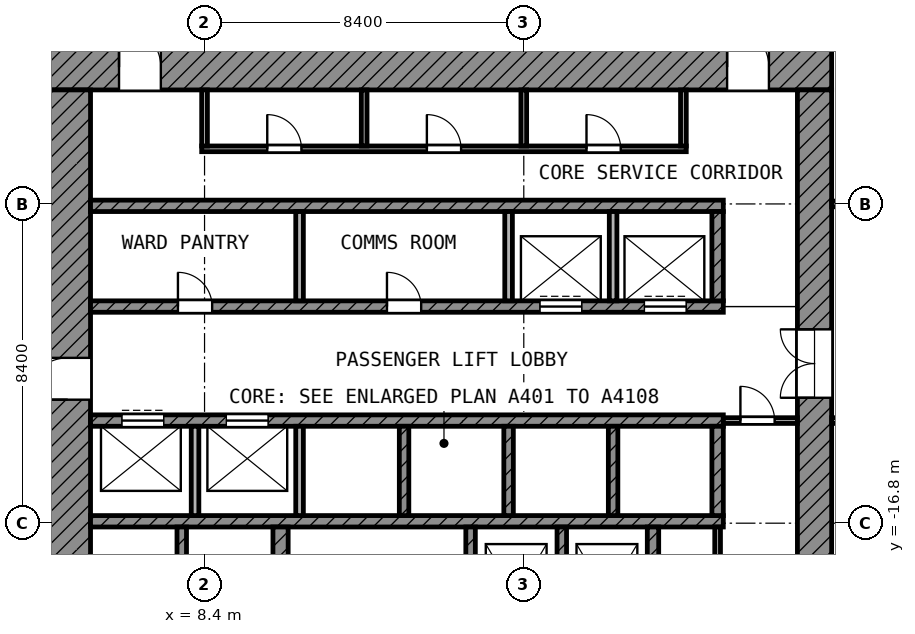
"""IFC4 building model, lengths in metres.
Left out: names, types, materials, properties, quantities, classifications, styles, units other than length and angle.
Written with IfcOpenShell. Run it as: python <this file> out.ifc"""

import sys

from ifc_helpers import new_model, si_unit, direction, frame, frame_2d, origin, place, context, subcontext, project, spatial, rectangle, extrude, element, fill, save


model = new_model("IFC4")
c1 = context("Model", 3, precision=1e-05, world=origin(), true_north=direction((0.0, 1.0)))
c2 = subcontext(c1, "Body", "Model", "MODEL_VIEW")
j1 = project(units=[si_unit("LENGTHUNIT", "METRE"), si_unit("PLANEANGLEUNIT", "RADIAN")], contexts=[c1])
p1 = place(None, origin())
s1 = spatial("IfcSite", under=j1, at=p1, CompositionType="ELEMENT")
p2 = place(p1, origin())
s2 = spatial("IfcBuilding", under=s1, at=p2, CompositionType="ELEMENT")
p3 = place(p2, frame((0.0, 0.0, 166.8)))
s3 = spatial("IfcBuildingStorey", under=s2, at=p3, CompositionType="ELEMENT", Elevation=166.8)
p4 = place(p3, frame((4.2, -4.8, 0.0), z_axis=(0.0, 0.0, 1.0), x_axis=(1.0, 0.0, 0.0)))
e1 = element("IfcWall", 1, at=p4, inside=s3, PredefinedType="SHEAR", context=c2, shape_type="SweptSolid", body=[
    extrude(rectangle(XDim=20.7, YDim=1.2, at=frame_2d((10.35, 0.0))), origin(), (0.0, 0.0, 1.0), 3.6),
])
p5 = place(p4, frame((1.95, 0.0, 0.0)))
e2 = element("IfcOpeningElement", 2, at=p5, cuts=e1, PredefinedType="OPENING", context=c2, shape_type="SweptSolid", body=[
    extrude(rectangle(XDim=1.1, YDim=2.1, at=frame_2d((0.55, 1.05))), frame((0.0, 0.61, 0.0), z_axis=(0.0, -1.0, 0.0), x_axis=(1.0, 0.0, 0.0)), (0.0, 0.0, 1.0), 1.22),
])
p6 = place(p4, frame((17.95, 0.0, 0.0)))
e3 = element("IfcOpeningElement", 3, at=p6, cuts=e1, PredefinedType="OPENING", context=c2, shape_type="SweptSolid", body=[
    extrude(rectangle(XDim=1.1, YDim=2.1, at=frame_2d((0.55, 1.05))), frame((0.0, 0.61, 0.0), z_axis=(0.0, -1.0, 0.0), x_axis=(1.0, 0.0, 0.0)), (0.0, 0.0, 1.0), 1.22),
])
p7 = place(p3, frame((4.8, -24.9, 0.0), z_axis=(0.0, 0.0, 1.0), x_axis=(0.0, 1.0, 0.0)))
e4 = element("IfcWall", 4, at=p7, inside=s3, PredefinedType="SHEAR", context=c2, shape_type="SweptSolid", body=[
    extrude(rectangle(XDim=19.5, YDim=1.2, at=frame_2d((9.75, 0.0))), origin(), (0.0, 0.0, 1.0), 3.6),
])
p8 = place(p7, frame((11.35, 0.0, 0.0)))
e5 = element("IfcOpeningElement", 5, at=p8, cuts=e4, PredefinedType="OPENING", context=c2, shape_type="SweptSolid", body=[
    extrude(rectangle(XDim=1.1, YDim=2.1, at=frame_2d((0.55, 1.05))), frame((0.0, 0.61, 0.0), z_axis=(0.0, -1.0, 0.0), x_axis=(1.0, 0.0, 0.0)), (0.0, 0.0, 1.0), 1.22),
])
p9 = place(p7, frame((2.05, 0.0, 0.0)))
e6 = element("IfcOpeningElement", 6, at=p9, cuts=e4, PredefinedType="OPENING", context=c2, shape_type="SweptSolid", body=[
    extrude(rectangle(XDim=1.1, YDim=2.1, at=frame_2d((0.55, 1.05))), frame((0.0, 0.61, 0.0), z_axis=(0.0, -1.0, 0.0), x_axis=(1.0, 0.0, 0.0)), (0.0, 0.0, 1.0), 1.22),
])
p10 = place(p3, frame((24.45, -24.0, 0.0), z_axis=(0.0, 0.0, 1.0), x_axis=(0.0, 1.0, 0.0)))
e7 = element("IfcWall", 7, at=p10, inside=s3, PredefinedType="SHEAR", context=c2, shape_type="SweptSolid", body=[
    extrude(rectangle(XDim=18.6, YDim=0.9, at=frame_2d((9.3, 0.0))), origin(), (0.0, 0.0, 1.0), 3.6),
])
p11 = place(p10, frame((10.5, 0.0, 0.0)))
e8 = element("IfcOpeningElement", 8, at=p11, cuts=e7, PredefinedType="OPENING", context=c2, shape_type="SweptSolid", body=[
    extrude(rectangle(XDim=1.8, YDim=2.1, at=frame_2d((0.9, 1.05))), frame((0.0, 0.46, 0.0), z_axis=(0.0, -1.0, 0.0), x_axis=(1.0, 0.0, 0.0)), (0.0, 0.0, 1.0), 0.92),
])
p12 = place(p3, frame((5.4, -8.45, 0.0), z_axis=(0.0, 0.0, 1.0), x_axis=(1.0, 0.0, 0.0)))
e9 = element("IfcWall", 9, at=p12, inside=s3, PredefinedType="SHEAR", context=c2, shape_type="SweptSolid", body=[
    extrude(rectangle(XDim=16.65, YDim=0.3, at=frame_2d((8.325, 0.0))), origin(), (0.0, 0.0, 1.0), 3.6),
])
p13 = place(p3, frame((5.4, -11.1, 0.0), z_axis=(0.0, 0.0, 1.0), x_axis=(1.0, 0.0, 0.0)))
e10 = element("IfcWall", 10, at=p13, inside=s3, PredefinedType="SHEAR", context=c2, shape_type="SweptSolid", body=[
    extrude(rectangle(XDim=16.65, YDim=0.3, at=frame_2d((8.325, 0.0))), origin(), (0.0, 0.0, 1.0), 3.6),
])
p14 = place(p13, frame((11.825, 0.0, 0.0)))
e11 = element("IfcOpeningElement", 11, at=p14, cuts=e10, PredefinedType="OPENING", context=c2, shape_type="SweptSolid", body=[
    extrude(rectangle(XDim=1.1, YDim=2.1, at=frame_2d((0.55, 1.05))), frame((0.0, 0.16, 0.0), z_axis=(0.0, -1.0, 0.0), x_axis=(1.0, 0.0, 0.0)), (0.0, 0.0, 1.0), 0.32),
])
p15 = place(p13, frame((14.575, 0.0, 0.0)))
e12 = element("IfcOpeningElement", 12, at=p15, cuts=e10, PredefinedType="OPENING", context=c2, shape_type="SweptSolid", body=[
    extrude(rectangle(XDim=1.1, YDim=2.1, at=frame_2d((0.55, 1.05))), frame((0.0, 0.16, 0.0), z_axis=(0.0, -1.0, 0.0), x_axis=(1.0, 0.0, 0.0)), (0.0, 0.0, 1.0), 0.32),
])
p16 = place(p13, frame((2.3, 0.0, 0.0)))
e13 = element("IfcOpeningElement", 13, at=p16, cuts=e10, PredefinedType="OPENING", context=c2, shape_type="SweptSolid", body=[
    extrude(rectangle(XDim=0.9, YDim=2.1, at=frame_2d((0.45, 1.05))), frame((0.0, 0.16, 0.0), z_axis=(0.0, -1.0, 0.0), x_axis=(1.0, 0.0, 0.0)), (0.0, 0.0, 1.0), 0.32),
])
p17 = place(p13, frame((7.8, 0.0, 0.0)))
e14 = element("IfcOpeningElement", 14, at=p17, cuts=e10, PredefinedType="OPENING", context=c2, shape_type="SweptSolid", body=[
    extrude(rectangle(XDim=0.9, YDim=2.1, at=frame_2d((0.45, 1.05))), frame((0.0, 0.16, 0.0), z_axis=(0.0, -1.0, 0.0), x_axis=(1.0, 0.0, 0.0)), (0.0, 0.0, 1.0), 0.32),
])
p18 = place(p3, frame((5.4, -14.1, 0.0), z_axis=(0.0, 0.0, 1.0), x_axis=(1.0, 0.0, 0.0)))
e15 = element("IfcWall", 15, at=p18, inside=s3, PredefinedType="SHEAR", context=c2, shape_type="SweptSolid", body=[
    extrude(rectangle(XDim=16.65, YDim=0.3, at=frame_2d((8.325, 0.0))), origin(), (0.0, 0.0, 1.0), 3.6),
])
p19 = place(p18, frame((0.825, 0.0, 0.0)))
e16 = element("IfcOpeningElement", 16, at=p19, cuts=e15, PredefinedType="OPENING", context=c2, shape_type="SweptSolid", body=[
    extrude(rectangle(XDim=1.1, YDim=2.1, at=frame_2d((0.55, 1.05))), frame((0.0, 0.16, 0.0), z_axis=(0.0, -1.0, 0.0), x_axis=(1.0, 0.0, 0.0)), (0.0, 0.0, 1.0), 0.32),
])
p20 = place(p18, frame((3.575, 0.0, 0.0)))
e17 = element("IfcOpeningElement", 17, at=p20, cuts=e15, PredefinedType="OPENING", context=c2, shape_type="SweptSolid", body=[
    extrude(rectangle(XDim=1.1, YDim=2.1, at=frame_2d((0.55, 1.05))), frame((0.0, 0.16, 0.0), z_axis=(0.0, -1.0, 0.0), x_axis=(1.0, 0.0, 0.0)), (0.0, 0.0, 1.0), 0.32),
])
p21 = place(p3, frame((5.4, -16.75, 0.0), z_axis=(0.0, 0.0, 1.0), x_axis=(1.0, 0.0, 0.0)))
e18 = element("IfcWall", 18, at=p21, inside=s3, PredefinedType="SHEAR", context=c2, shape_type="SweptSolid", body=[
    extrude(rectangle(XDim=16.65, YDim=0.3, at=frame_2d((8.325, 0.0))), origin(), (0.0, 0.0, 1.0), 3.6),
])
p22 = place(p3, frame((10.4, -20.05, 0.0), z_axis=(0.0, 0.0, 1.0), x_axis=(0.0, 1.0, 0.0)))
e19 = element("IfcWall", 19, at=p22, inside=s3, PredefinedType="SHEAR", context=c2, shape_type="SweptSolid", body=[
    extrude(rectangle(XDim=3.15, YDim=0.4, at=frame_2d((1.575, 0.0))), origin(), (0.0, 0.0, 1.0), 3.6),
])
p23 = place(p3, frame((20.2, -20.35, 0.0), z_axis=(0.0, 0.0, 1.0), x_axis=(0.0, 1.0, 0.0)))
e20 = element("IfcWall", 20, at=p23, inside=s3, PredefinedType="SHEAR", context=c2, shape_type="SweptSolid", body=[
    extrude(rectangle(XDim=3.45, YDim=0.3, at=frame_2d((1.725, 0.0))), origin(), (0.0, 0.0, 1.0), 3.6),
])
p24 = place(p3, frame((21.9, -10.95, 0.0), z_axis=(0.0, 0.0, 1.0), x_axis=(0.0, 1.0, 0.0)))
e21 = element("IfcWall", 21, at=p24, inside=s3, PredefinedType="SHEAR", context=c2, shape_type="SweptSolid", body=[
    extrude(rectangle(XDim=2.35, YDim=0.3, at=frame_2d((1.175, 0.0))), origin(), (0.0, 0.0, 1.0), 3.6),
])
p25 = place(p3, frame((21.9, -16.6, 0.0), z_axis=(0.0, 0.0, 1.0), x_axis=(0.0, 1.0, 0.0)))
e22 = element("IfcWall", 22, at=p25, inside=s3, PredefinedType="SHEAR", context=c2, shape_type="SweptSolid", body=[
    extrude(rectangle(XDim=2.35, YDim=0.3, at=frame_2d((1.175, 0.0))), origin(), (0.0, 0.0, 1.0), 3.6),
])
for number, where, z_axis, x_axis in (
    (23, (7.8, -20.05, 0.0), (0.0, 0.0, 1.0), (0.0, 1.0, 0.0)),
    (24, (15.4, -20.05, 0.0), (0.0, 0.0, 1.0), (0.0, 1.0, 0.0)),
    (25, (17.8, -20.05, 0.0), (0.0, 0.0, 1.0), (0.0, 1.0, 0.0)),
):
    element("IfcWall", number, at=place(p3, frame(where, z_axis=z_axis, x_axis=x_axis)), inside=s3, PredefinedType="SHEAR", context=c2, shape_type="SweptSolid", body=[
        extrude(rectangle(XDim=3.15, YDim=0.25, at=frame_2d((1.575, 0.0))), origin(), (0.0, 0.0, 1.0), 3.6),
    ])
for number, where, z_axis, x_axis in (
    (26, (10.9, -10.95, 0.0), (0.0, 0.0, 1.0), (0.0, 1.0, 0.0)),
    (27, (16.4, -10.95, 0.0), (0.0, 0.0, 1.0), (0.0, 1.0, 0.0)),
    (28, (19.15, -10.95, 0.0), (0.0, 0.0, 1.0), (0.0, 1.0, 0.0)),
):
    element("IfcWall", number, at=place(p3, frame(where, z_axis=z_axis, x_axis=x_axis)), inside=s3, PredefinedType="PARTITIONING", context=c2, shape_type="SweptSolid", body=[
        extrude(rectangle(XDim=2.35, YDim=0.2, at=frame_2d((1.175, 0.0))), origin(), (0.0, 0.0, 1.0), 3.6),
    ])
for number, where, z_axis, x_axis in (
    (29, (8.15, -16.6, 0.0), (0.0, 0.0, 1.0), (0.0, 1.0, 0.0)),
    (30, (10.9, -16.6, 0.0), (0.0, 0.0, 1.0), (0.0, 1.0, 0.0)),
):
    element("IfcWall", number, at=place(p3, frame(where, z_axis=z_axis, x_axis=x_axis)), inside=s3, PredefinedType="PARTITIONING", context=c2, shape_type="SweptSolid", body=[
        extrude(rectangle(XDim=2.35, YDim=0.2, at=frame_2d((1.175, 0.0))), origin(), (0.0, 0.0, 1.0), 3.6),
    ])
for number, where, z_axis, x_axis in (
    (31, (13.65, -16.6, 0.0), (0.0, 0.0, 1.0), (0.0, 1.0, 0.0)),
    (32, (16.4, -16.6, 0.0), (0.0, 0.0, 1.0), (0.0, 1.0, 0.0)),
    (33, (19.15, -16.6, 0.0), (0.0, 0.0, 1.0), (0.0, 1.0, 0.0)),
):
    element("IfcWall", number, at=place(p3, frame(where, z_axis=z_axis, x_axis=x_axis)), inside=s3, PredefinedType="SHEAR", context=c2, shape_type="SweptSolid", body=[
        extrude(rectangle(XDim=2.35, YDim=0.25, at=frame_2d((1.175, 0.0))), origin(), (0.0, 0.0, 1.0), 3.6),
    ])
p26 = place(p3, frame((21.9, -19.05, 0.0), z_axis=(0.0, 0.0, 1.0), x_axis=(0.0, 1.0, 0.0)))
e34 = element("IfcWall", 34, at=p26, inside=s3, PredefinedType="PARTITIONING", context=c2, shape_type="SweptSolid", body=[
    extrude(rectangle(XDim=2.15, YDim=0.15, at=frame_2d((1.075, 0.0))), origin(), (0.0, 0.0, 1.0), 3.6),
])
p27 = place(p3, frame((22.05, -14.1, 0.0), z_axis=(0.0, 0.0, 1.0), x_axis=(1.0, 0.0, 0.0)))
e35 = element("IfcWall", 35, at=p27, inside=s3, PredefinedType="PARTITIONING", context=c2, shape_type="SweptSolid", body=[
    extrude(rectangle(XDim=1.95, YDim=0.15, at=frame_2d((0.975, 0.0))), origin(), (0.0, 0.0, 1.0), 3.6),
])
p28 = place(p27, frame((0.45, 0.0, 0.0)))
e36 = element("IfcOpeningElement", 36, at=p28, cuts=e35, PredefinedType="OPENING", context=c2, shape_type="SweptSolid", body=[
    extrude(rectangle(XDim=0.9, YDim=2.1, at=frame_2d((0.45, 1.05))), frame((0.0, 0.085, 0.0), z_axis=(0.0, -1.0, 0.0), x_axis=(1.0, 0.0, 0.0)), (0.0, 0.0, 1.0), 0.17),
])
p29 = place(p3, frame((8.325, -6.95, 0.0), z_axis=(0.0, 0.0, 1.0), x_axis=(1.0, 0.0, 0.0)))
e37 = element("IfcWall", 37, at=p29, inside=s3, PredefinedType="PARTITIONING", context=c2, shape_type="SweptSolid", body=[
    extrude(rectangle(XDim=12.75, YDim=0.15, at=frame_2d((6.375, 0.0))), origin(), (0.0, 0.0, 1.0), 3.6),
])
p30 = place(p29, frame((1.725, 0.0, 0.0)))
e38 = element("IfcOpeningElement", 38, at=p30, cuts=e37, PredefinedType="OPENING", context=c2, shape_type="SweptSolid", body=[
    extrude(rectangle(XDim=0.9, YDim=2.1, at=frame_2d((0.45, 1.05))), frame((0.0, 0.085, 0.0), z_axis=(0.0, -1.0, 0.0), x_axis=(1.0, 0.0, 0.0)), (0.0, 0.0, 1.0), 0.17),
])
p31 = place(p29, frame((5.925, 0.0, 0.0)))
e39 = element("IfcOpeningElement", 39, at=p31, cuts=e37, PredefinedType="OPENING", context=c2, shape_type="SweptSolid", body=[
    extrude(rectangle(XDim=0.9, YDim=2.1, at=frame_2d((0.45, 1.05))), frame((0.0, 0.085, 0.0), z_axis=(0.0, -1.0, 0.0), x_axis=(1.0, 0.0, 0.0)), (0.0, 0.0, 1.0), 0.17),
])
p32 = place(p29, frame((10.125, 0.0, 0.0)))
e40 = element("IfcOpeningElement", 40, at=p32, cuts=e37, PredefinedType="OPENING", context=c2, shape_type="SweptSolid", body=[
    extrude(rectangle(XDim=0.9, YDim=2.1, at=frame_2d((0.45, 1.05))), frame((0.0, 0.085, 0.0), z_axis=(0.0, -1.0, 0.0), x_axis=(1.0, 0.0, 0.0)), (0.0, 0.0, 1.0), 0.17),
])
for number, where, z_axis, x_axis in (
    (41, (8.4, -6.875, 0.0), (0.0, 0.0, 1.0), (0.0, 1.0, 0.0)),
    (42, (12.6, -6.875, 0.0), (0.0, 0.0, 1.0), (0.0, 1.0, 0.0)),
    (43, (16.8, -6.875, 0.0), (0.0, 0.0, 1.0), (0.0, 1.0, 0.0)),
    (44, (21.0, -6.875, 0.0), (0.0, 0.0, 1.0), (0.0, 1.0, 0.0)),
):
    element("IfcWall", number, at=place(p3, frame(where, z_axis=z_axis, x_axis=x_axis)), inside=s3, PredefinedType="PARTITIONING", context=c2, shape_type="SweptSolid", body=[
        extrude(rectangle(XDim=1.475, YDim=0.15, at=frame_2d((0.738, 0.0))), origin(), (0.0, 0.0, 1.0), 3.6),
    ])
p33 = place(p3, frame((24.9, -14.1, 0.0), z_axis=(0.0, 0.0, 1.0), x_axis=(1.0, 0.0, 0.0)))
e45 = element("IfcWall", 45, at=p33, inside=s3, PredefinedType="PARTITIONING", context=c2, shape_type="SweptSolid", body=[
    extrude(rectangle(XDim=4.425, YDim=0.15, at=frame_2d((2.212, 0.0))), origin(), (0.0, 0.0, 1.0), 3.6),
])
p34 = place(p33, frame((1.65, 0.0, 0.0)))
e46 = element("IfcOpeningElement", 46, at=p34, cuts=e45, PredefinedType="OPENING", context=c2, shape_type="SweptSolid", body=[
    extrude(rectangle(XDim=1.5, YDim=2.1, at=frame_2d((0.75, 1.05))), frame((0.0, 0.085, 0.0), z_axis=(0.0, -1.0, 0.0), x_axis=(1.0, 0.0, 0.0)), (0.0, 0.0, 1.0), 0.17),
])
p35 = place(p3, frame((24.9, -8.4, 0.0), z_axis=(0.0, 0.0, 1.0), x_axis=(1.0, 0.0, 0.0)))
e47 = element("IfcWall", 47, at=p35, inside=s3, PredefinedType="PARTITIONING", context=c2, shape_type="SweptSolid", body=[
    extrude(rectangle(XDim=15.282, YDim=0.15, at=frame_2d((7.641, 0.0))), origin(), (0.0, 0.0, 1.0), 3.6),
])
p36 = place(p35, frame((3.9, 0.0, 0.0)))
e48 = element("IfcOpeningElement", 48, at=p36, cuts=e47, PredefinedType="OPENING", context=c2, shape_type="SweptSolid", body=[
    extrude(rectangle(XDim=1.2, YDim=2.1, at=frame_2d((0.6, 1.05))), frame((0.0, 0.085, 0.0), z_axis=(0.0, -1.0, 0.0), x_axis=(1.0, 0.0, 0.0)), (0.0, 0.0, 1.0), 0.17),
])
p37 = place(p35, frame((10.3, 0.0, 0.0)))
e49 = element("IfcOpeningElement", 49, at=p37, cuts=e47, PredefinedType="OPENING", context=c2, shape_type="SweptSolid", body=[
    extrude(rectangle(XDim=1.0, YDim=2.1, at=frame_2d((0.5, 1.05))), frame((0.0, 0.085, 0.0), z_axis=(0.0, -1.0, 0.0), x_axis=(1.0, 0.0, 0.0)), (0.0, 0.0, 1.0), 0.17),
])
p38 = place(p14, origin())
e50 = element("IfcDoor", 50, at=p38, inside=s3, OperationType="DOUBLE_DOOR_SLIDING", PredefinedType="DOOR", context=c2, shape_type="SweptSolid", body=[
    extrude(rectangle(XDim=1.1, YDim=2.1, at=frame_2d((0.55, 1.05))), frame((0.0, 0.025, 0.0), z_axis=(0.0, -1.0, 0.0), x_axis=(1.0, 0.0, 0.0)), (0.0, 0.0, 1.0), 0.05),
])
fill(e11, e50)
p39 = place(p15, origin())
e51 = element("IfcDoor", 51, at=p39, inside=s3, OperationType="DOUBLE_DOOR_SLIDING", PredefinedType="DOOR", context=c2, shape_type="SweptSolid", body=[
    extrude(rectangle(XDim=1.1, YDim=2.1, at=frame_2d((0.55, 1.05))), frame((0.0, 0.025, 0.0), z_axis=(0.0, -1.0, 0.0), x_axis=(1.0, 0.0, 0.0)), (0.0, 0.0, 1.0), 0.05),
])
fill(e12, e51)
p40 = place(p19, origin())
e52 = element("IfcDoor", 52, at=p40, inside=s3, OperationType="DOUBLE_DOOR_SLIDING", PredefinedType="DOOR", context=c2, shape_type="SweptSolid", body=[
    extrude(rectangle(XDim=1.1, YDim=2.1, at=frame_2d((0.55, 1.05))), frame((0.0, 0.025, 0.0), z_axis=(0.0, -1.0, 0.0), x_axis=(1.0, 0.0, 0.0)), (0.0, 0.0, 1.0), 0.05),
])
fill(e16, e52)
p41 = place(p20, origin())
e53 = element("IfcDoor", 53, at=p41, inside=s3, OperationType="DOUBLE_DOOR_SLIDING", PredefinedType="DOOR", context=c2, shape_type="SweptSolid", body=[
    extrude(rectangle(XDim=1.1, YDim=2.1, at=frame_2d((0.55, 1.05))), frame((0.0, 0.025, 0.0), z_axis=(0.0, -1.0, 0.0), x_axis=(1.0, 0.0, 0.0)), (0.0, 0.0, 1.0), 0.05),
])
fill(e17, e53)
p42 = place(p8, origin())
e54 = element("IfcDoor", 54, at=p42, inside=s3, OperationType="SINGLE_SWING_LEFT", PredefinedType="DOOR", context=c2, shape_type="SweptSolid", body=[
    extrude(rectangle(XDim=1.1, YDim=2.1, at=frame_2d((0.55, 1.05))), frame((0.0, 0.025, 0.0), z_axis=(0.0, -1.0, 0.0), x_axis=(1.0, 0.0, 0.0)), (0.0, 0.0, 1.0), 0.05),
])
fill(e5, e54)
p43 = place(p5, origin())
e55 = element("IfcDoor", 55, at=p43, inside=s3, OperationType="SINGLE_SWING_LEFT", PredefinedType="DOOR", context=c2, shape_type="SweptSolid", body=[
    extrude(rectangle(XDim=1.1, YDim=2.1, at=frame_2d((0.55, 1.05))), frame((0.0, 0.025, 0.0), z_axis=(0.0, -1.0, 0.0), x_axis=(1.0, 0.0, 0.0)), (0.0, 0.0, 1.0), 0.05),
])
fill(e2, e55)
p44 = place(p6, origin())
e56 = element("IfcDoor", 56, at=p44, inside=s3, OperationType="SINGLE_SWING_LEFT", PredefinedType="DOOR", context=c2, shape_type="SweptSolid", body=[
    extrude(rectangle(XDim=1.1, YDim=2.1, at=frame_2d((0.55, 1.05))), frame((0.0, 0.025, 0.0), z_axis=(0.0, -1.0, 0.0), x_axis=(1.0, 0.0, 0.0)), (0.0, 0.0, 1.0), 0.05),
])
fill(e3, e56)
p45 = place(p11, origin())
e57 = element("IfcDoor", 57, at=p45, inside=s3, OperationType="DOUBLE_DOOR_SINGLE_SWING", PredefinedType="DOOR", context=c2, shape_type="SweptSolid", body=[
    extrude(rectangle(XDim=1.8, YDim=2.1, at=frame_2d((0.9, 1.05))), frame((0.0, 0.025, 0.0), z_axis=(0.0, -1.0, 0.0), x_axis=(1.0, 0.0, 0.0)), (0.0, 0.0, 1.0), 0.05),
])
fill(e8, e57)
p46 = place(p30, origin())
e58 = element("IfcDoor", 58, at=p46, inside=s3, OperationType="SINGLE_SWING_LEFT", PredefinedType="DOOR", context=c2, shape_type="SweptSolid", body=[
    extrude(rectangle(XDim=0.9, YDim=2.1, at=frame_2d((0.45, 1.05))), frame((0.0, 0.025, 0.0), z_axis=(0.0, -1.0, 0.0), x_axis=(1.0, 0.0, 0.0)), (0.0, 0.0, 1.0), 0.05),
])
fill(e38, e58)
p47 = place(p31, origin())
e59 = element("IfcDoor", 59, at=p47, inside=s3, OperationType="SINGLE_SWING_LEFT", PredefinedType="DOOR", context=c2, shape_type="SweptSolid", body=[
    extrude(rectangle(XDim=0.9, YDim=2.1, at=frame_2d((0.45, 1.05))), frame((0.0, 0.025, 0.0), z_axis=(0.0, -1.0, 0.0), x_axis=(1.0, 0.0, 0.0)), (0.0, 0.0, 1.0), 0.05),
])
fill(e39, e59)
p48 = place(p32, origin())
e60 = element("IfcDoor", 60, at=p48, inside=s3, OperationType="SINGLE_SWING_LEFT", PredefinedType="DOOR", context=c2, shape_type="SweptSolid", body=[
    extrude(rectangle(XDim=0.9, YDim=2.1, at=frame_2d((0.45, 1.05))), frame((0.0, 0.025, 0.0), z_axis=(0.0, -1.0, 0.0), x_axis=(1.0, 0.0, 0.0)), (0.0, 0.0, 1.0), 0.05),
])
fill(e40, e60)
p49 = place(p28, origin())
e61 = element("IfcDoor", 61, at=p49, inside=s3, OperationType="SINGLE_SWING_LEFT", PredefinedType="DOOR", context=c2, shape_type="SweptSolid", body=[
    extrude(rectangle(XDim=0.9, YDim=2.1, at=frame_2d((0.45, 1.05))), frame((0.0, 0.025, 0.0), z_axis=(0.0, -1.0, 0.0), x_axis=(1.0, 0.0, 0.0)), (0.0, 0.0, 1.0), 0.05),
])
fill(e36, e61)
p50 = place(p16, origin())
e62 = element("IfcDoor", 62, at=p50, inside=s3, OperationType="SINGLE_SWING_LEFT", PredefinedType="DOOR", context=c2, shape_type="SweptSolid", body=[
    extrude(rectangle(XDim=0.9, YDim=2.1, at=frame_2d((0.45, 1.05))), frame((0.0, 0.025, 0.0), z_axis=(0.0, -1.0, 0.0), x_axis=(1.0, 0.0, 0.0)), (0.0, 0.0, 1.0), 0.05),
])
fill(e13, e62)
p51 = place(p17, origin())
e63 = element("IfcDoor", 63, at=p51, inside=s3, OperationType="SINGLE_SWING_LEFT", PredefinedType="DOOR", context=c2, shape_type="SweptSolid", body=[
    extrude(rectangle(XDim=0.9, YDim=2.1, at=frame_2d((0.45, 1.05))), frame((0.0, 0.025, 0.0), z_axis=(0.0, -1.0, 0.0), x_axis=(1.0, 0.0, 0.0)), (0.0, 0.0, 1.0), 0.05),
])
fill(e14, e63)
save(model, sys.argv[1])
